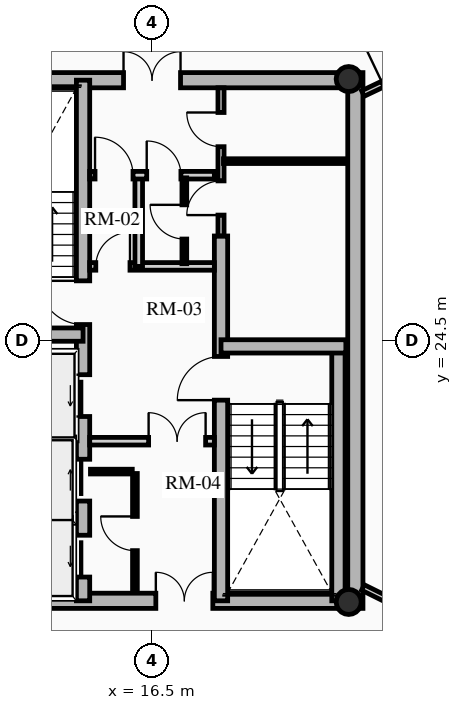
"""IFC4 building model, lengths in metres.
Left out: names, types, materials, properties, quantities, classifications, styles, units other than length and angle.
Written with IfcOpenShell. Run it as: python <this file> out.ifc"""

import sys

from ifc_helpers import new_model, si_unit, direction, frame, frame_2d, origin, origin_2d, place, context, subcontext, project, spatial, rectangle, hollow_circle, extrude, source, transform, mapped, element, fill, save


model = new_model("IFC4")
c1 = context("Model", 3, precision=1e-05, world=origin(), true_north=direction((0.0, 1.0)))
c2 = subcontext(c1, "Body", "Model", "MODEL_VIEW")
j1 = project(units=[si_unit("LENGTHUNIT", "METRE"), si_unit("PLANEANGLEUNIT", "RADIAN")], contexts=[c1])
p1 = place(None, origin())
s1 = spatial("IfcSite", under=j1, at=p1, CompositionType="ELEMENT")
p2 = place(p1, origin())
s2 = spatial("IfcBuilding", under=s1, at=p2, CompositionType="ELEMENT")
p3 = place(p2, frame((0.0, 0.0, 202.48)))
s3 = spatial("IfcBuildingStorey", under=s2, at=p3, CompositionType="ELEMENT", Elevation=202.48)
p4 = place(p3, frame((21.85, 17.45, 0.0), z_axis=(0.0, 0.0, 1.0), x_axis=(0.0, 1.0, 0.0)))
e1 = element("IfcWall", 1, at=p4, inside=s3, PredefinedType="SHEAR", context=c2, shape_type="SweptSolid", body=[
    extrude(rectangle(XDim=14.1, YDim=0.4, at=frame_2d((7.05, 0.0))), origin(), (0.0, 0.0, 1.0), 2.91),
])
p5 = place(p3, frame((11.15, 17.65, 0.0), z_axis=(0.0, 0.0, 1.0), x_axis=(1.0, 0.0, 0.0)))
e2 = element("IfcWall", 2, at=p5, inside=s3, PredefinedType="SHEAR", context=c2, shape_type="SweptSolid", body=[
    extrude(rectangle(XDim=10.7, YDim=0.4, at=frame_2d((5.35, 0.0))), origin(), (0.0, 0.0, 1.0), 2.91),
])
m1 = source(origin(), c2, "Body", "SweptSolid", [
    extrude(rectangle(XDim=1.5, YDim=2.02, at=frame_2d((0.75, 1.01))), frame((0.0, 0.21, 0.0), z_axis=(0.0, -1.0, 0.0), x_axis=(1.0, 0.0, 0.0)), (0.0, 0.0, 1.0), 0.42),
])
p6 = place(p5, frame((5.45, 0.0, 0.0)))
e3 = element("IfcOpeningElement", 3, at=p6, cuts=e2, PredefinedType="OPENING", context=c2, shape_type="MappedRepresentation", body=[
    mapped(m1, transform((0.0, 0.0, 0.0), x_axis=(1.0, 0.0, 0.0), y_axis=(0.0, 1.0, 0.0), z_axis=(0.0, 0.0, 1.0), scale=1.0)),
])
p7 = place(p3, frame((11.15, 31.35, 0.0), z_axis=(0.0, 0.0, 1.0), x_axis=(1.0, 0.0, 0.0)))
e4 = element("IfcWall", 4, at=p7, inside=s3, PredefinedType="SHEAR", context=c2, shape_type="SweptSolid", body=[
    extrude(rectangle(XDim=10.7, YDim=0.4, at=frame_2d((5.35, 0.0))), origin(), (0.0, 0.0, 1.0), 2.91),
])
p8 = place(p7, frame((4.6, 0.0, 0.0)))
e5 = element("IfcOpeningElement", 5, at=p8, cuts=e4, PredefinedType="OPENING", context=c2, shape_type="MappedRepresentation", body=[
    mapped(m1, transform((0.0, 0.0, 0.0), x_axis=(1.0, 0.0, 0.0), y_axis=(0.0, 1.0, 0.0), z_axis=(0.0, 0.0, 1.0), scale=1.0)),
])
p9 = place(p3, frame((14.685, 17.65, 0.0), z_axis=(0.0, 0.0, 1.0), x_axis=(0.0, 1.0, 0.0)))
e6 = element("IfcWall", 6, at=p9, inside=s3, PredefinedType="SHEAR", context=c2, shape_type="SweptSolid", body=[
    extrude(rectangle(XDim=13.7, YDim=0.35, at=frame_2d((6.85, 0.0))), origin(), (0.0, 0.0, 1.0), 2.91),
])
m2 = source(origin(), c2, "Body", "SweptSolid", [
    extrude(rectangle(XDim=1.1, YDim=2.015, at=frame_2d((0.55, 1.007))), frame((0.0, 0.185, 0.0), z_axis=(0.0, -1.0, 0.0), x_axis=(1.0, 0.0, 0.0)), (0.0, 0.0, 1.0), 0.37),
])
p10 = place(p9, frame((4.85, 0.0, 0.0)))
e7 = element("IfcOpeningElement", 7, at=p10, cuts=e6, PredefinedType="OPENING", context=c2, shape_type="MappedRepresentation", body=[
    mapped(m2, transform((0.0, 0.0, 0.0), x_axis=(1.0, 0.0, 0.0), y_axis=(0.0, 1.0, 0.0), z_axis=(0.0, 0.0, 1.0), scale=1.0)),
])
p11 = place(p9, frame((0.625, 0.0, 0.0)))
e8 = element("IfcOpeningElement", 8, at=p11, cuts=e6, PredefinedType="OPENING", context=c2, shape_type="MappedRepresentation", body=[
    mapped(m2, transform((0.0, 0.0, 0.0), x_axis=(1.0, 0.0, 0.0), y_axis=(0.0, 1.0, 0.0), z_axis=(0.0, 0.0, 1.0), scale=1.0)),
])
p12 = place(p9, frame((2.625, 0.0, 0.0)))
e9 = element("IfcOpeningElement", 9, at=p12, cuts=e6, PredefinedType="OPENING", context=c2, shape_type="MappedRepresentation", body=[
    mapped(m2, transform((0.0, 0.0, 0.0), x_axis=(1.0, 0.0, 0.0), y_axis=(0.0, 1.0, 0.0), z_axis=(0.0, 0.0, 1.0), scale=1.0)),
])
m3 = source(origin(), c2, "Body", "SweptSolid", [
    extrude(rectangle(XDim=1.15, YDim=2.02, at=frame_2d((0.575, 1.01))), frame((0.0, 0.185, 0.0), z_axis=(0.0, -1.0, 0.0), x_axis=(1.0, 0.0, 0.0)), (0.0, 0.0, 1.0), 0.37),
])
p13 = place(p9, frame((7.27, 0.0, 0.0)))
e10 = element("IfcOpeningElement", 10, at=p13, cuts=e6, PredefinedType="OPENING", context=c2, shape_type="MappedRepresentation", body=[
    mapped(m3, transform((0.0, 0.0, 0.0), x_axis=(1.0, 0.0, 0.0), y_axis=(0.0, 1.0, 0.0), z_axis=(0.0, 0.0, 1.0), scale=1.0)),
])
p14 = place(p3, frame((18.315, 17.65, 0.0), z_axis=(0.0, 0.0, 1.0), x_axis=(0.0, 1.0, 0.0)))
e11 = element("IfcWall", 11, at=p14, inside=s3, PredefinedType="SHEAR", context=c2, shape_type="SweptSolid", body=[
    extrude(rectangle(XDim=9.6, YDim=0.35, at=frame_2d((4.8, 0.0))), origin(), (0.0, 0.0, 1.0), 2.91),
])
p15 = place(p14, frame((5.28, 0.0, 0.0)))
e12 = element("IfcOpeningElement", 12, at=p15, cuts=e11, PredefinedType="OPENING", context=c2, shape_type="MappedRepresentation", body=[
    mapped(m3, transform((0.0, 0.0, 0.0), x_axis=(1.0, 0.0, 0.0), y_axis=(0.0, 1.0, 0.0), z_axis=(0.0, 0.0, 1.0), scale=1.0)),
])
p16 = place(p3, frame((11.4, 24.655, 0.0), z_axis=(0.0, 0.0, 1.0), x_axis=(1.0, 0.0, 0.0)))
e13 = element("IfcWall", 13, at=p16, inside=s3, PredefinedType="SHEAR", context=c2, shape_type="SweptSolid", body=[
    extrude(rectangle(XDim=3.285, YDim=0.35, at=frame_2d((1.643, 0.0))), origin(), (0.0, 0.0, 1.0), 2.91),
])
p17 = place(p3, frame((21.405, 17.65, 0.0), z_axis=(0.0, 0.0, 1.0), x_axis=(0.0, 1.0, 0.0)))
e14 = element("IfcWall", 14, at=p17, inside=s3, PredefinedType="SHEAR", context=c2, shape_type="SweptSolid", body=[
    extrude(rectangle(XDim=6.695, YDim=0.35, at=frame_2d((3.348, 0.0))), origin(), (0.0, 0.0, 1.0), 2.91),
])
p18 = place(p3, frame((18.315, 24.345, 0.0), z_axis=(0.0, 0.0, 1.0), x_axis=(1.0, 0.0, 0.0)))
e15 = element("IfcWall", 15, at=p18, inside=s3, PredefinedType="SHEAR", context=c2, shape_type="SweptSolid", body=[
    extrude(rectangle(XDim=3.285, YDim=0.35, at=frame_2d((1.643, 0.0))), origin(), (0.0, 0.0, 1.0), 2.91),
])
for number, where, z_axis, x_axis in (
    (16, (21.675, 17.62, 0.0), (0.0, 0.0, 1.0), (1.0, 0.0, 0.0)),
    (17, (21.675, 31.38, 0.0), (0.0, 0.0, 1.0), (1.0, 0.0, 0.0)),
):
    element("IfcColumn", number, at=place(p3, frame(where, z_axis=z_axis, x_axis=x_axis)), inside=s3, PredefinedType="COLUMN", context=c2, shape_type="SweptSolid", body=[
        extrude(hollow_circle(Radius=0.33, WallThickness=0.025, at=origin_2d()), origin(), (0.0, 0.0, 1.0), 2.91),
    ])
for number, where, z_axis, x_axis in (
    (18, (11.52, 21.8, 0.0), (0.0, 0.0, 1.0), (1.0, 0.0, 0.0)),
    (19, (11.52, 19.825, 0.0), (0.0, 0.0, 1.0), (1.0, 0.0, 0.0)),
):
    element("IfcWall", number, at=place(p3, frame(where, z_axis=z_axis, x_axis=x_axis)), inside=s3, PredefinedType="SHEAR", context=c2, shape_type="SweptSolid", body=[
        extrude(rectangle(XDim=2.97, YDim=0.2, at=frame_2d((1.485, 0.0))), origin(), (0.0, 0.0, 1.0), 2.91),
    ])
p19 = place(p3, frame((14.86, 21.85, 0.0), z_axis=(0.0, 0.0, 1.0), x_axis=(1.0, 0.0, 0.0)))
e20 = element("IfcWall", 20, at=p19, inside=s3, PredefinedType="PARTITIONING", context=c2, shape_type="SweptSolid", body=[
    extrude(rectangle(XDim=3.28, YDim=0.2, at=frame_2d((1.64, 0.0))), origin(), (0.0, 0.0, 1.0), 2.685),
])
m4 = source(origin(), c2, "Body", "SweptSolid", [
    extrude(rectangle(XDim=1.5, YDim=2.02, at=frame_2d((0.75, 1.01))), frame((0.0, 0.11, 0.0), z_axis=(0.0, -1.0, 0.0), x_axis=(1.0, 0.0, 0.0)), (0.0, 0.0, 1.0), 0.22),
])
p20 = place(p19, frame((1.55, 0.0, 0.0)))
e21 = element("IfcOpeningElement", 21, at=p20, cuts=e20, PredefinedType="OPENING", context=c2, shape_type="MappedRepresentation", body=[
    mapped(m4, transform((0.0, 0.0, 0.0), x_axis=(1.0, 0.0, 0.0), y_axis=(0.0, 1.0, 0.0), z_axis=(0.0, 0.0, 1.0), scale=1.0)),
])
p21 = place(p3, frame((14.86, 26.45, 0.0), z_axis=(0.0, 0.0, 1.0), x_axis=(1.0, 0.0, 0.0)))
e22 = element("IfcWall", 22, at=p21, inside=s3, PredefinedType="PARTITIONING", context=c2, shape_type="SweptSolid", body=[
    extrude(rectangle(XDim=3.28, YDim=0.2, at=frame_2d((1.64, 0.0))), origin(), (0.0, 0.0, 1.0), 2.685),
])
m5 = source(origin(), c2, "Body", "SweptSolid", [
    extrude(rectangle(XDim=0.9, YDim=2.005, at=frame_2d((0.45, 1.002))), frame((0.0, 0.11, 0.0), z_axis=(0.0, -1.0, 0.0), x_axis=(1.0, 0.0, 0.0)), (0.0, 0.0, 1.0), 0.22),
])
p22 = place(p21, frame((0.16, 0.0, 0.0)))
e23 = element("IfcOpeningElement", 23, at=p22, cuts=e22, PredefinedType="OPENING", context=c2, shape_type="MappedRepresentation", body=[
    mapped(m5, transform((0.0, 0.0, 0.0), x_axis=(1.0, 0.0, 0.0), y_axis=(0.0, 1.0, 0.0), z_axis=(0.0, 0.0, 1.0), scale=1.0)),
])
p23 = place(p3, frame((16.15, 26.45, 0.0), z_axis=(0.0, 0.0, 1.0), x_axis=(0.0, 1.0, 0.0)))
e24 = element("IfcWall", 24, at=p23, inside=s3, PredefinedType="PARTITIONING", context=c2, shape_type="SweptSolid", body=[
    extrude(rectangle(XDim=2.4, YDim=0.2, at=frame_2d((1.2, 0.0))), origin(), (0.0, 0.0, 1.0), 2.685),
])
p24 = place(p3, frame((14.86, 28.85, 0.0), z_axis=(0.0, 0.0, 1.0), x_axis=(1.0, 0.0, 0.0)))
e25 = element("IfcWall", 25, at=p24, inside=s3, PredefinedType="PARTITIONING", context=c2, shape_type="SweptSolid", body=[
    extrude(rectangle(XDim=3.28, YDim=0.2, at=frame_2d((1.64, 0.0))), origin(), (0.0, 0.0, 1.0), 2.685),
])
m6 = source(origin(), c2, "Body", "SweptSolid", [
    extrude(rectangle(XDim=1.0, YDim=2.015, at=frame_2d((0.5, 1.007))), frame((0.0, 0.11, 0.0), z_axis=(0.0, -1.0, 0.0), x_axis=(1.0, 0.0, 0.0)), (0.0, 0.0, 1.0), 0.22),
])
p25 = place(p24, frame((0.14, 0.0, 0.0)))
e26 = element("IfcOpeningElement", 26, at=p25, cuts=e25, PredefinedType="OPENING", context=c2, shape_type="MappedRepresentation", body=[
    mapped(m6, transform((0.0, 0.0, 0.0), x_axis=(1.0, 0.0, 0.0), y_axis=(0.0, 1.0, 0.0), z_axis=(0.0, 0.0, 1.0), scale=1.0)),
])
p26 = place(p24, frame((1.5, 0.0, 0.0)))
e27 = element("IfcOpeningElement", 27, at=p26, cuts=e25, PredefinedType="OPENING", context=c2, shape_type="MappedRepresentation", body=[
    mapped(m5, transform((0.0, 0.0, 0.0), x_axis=(1.0, 0.0, 0.0), y_axis=(0.0, 1.0, 0.0), z_axis=(0.0, 0.0, 1.0), scale=1.0)),
])
p27 = place(p3, frame((16.05, 17.92, 0.0), z_axis=(0.0, 0.0, 1.0), x_axis=(0.0, 1.0, 0.0)))
e28 = element("IfcWall", 28, at=p27, inside=s3, PredefinedType="PARTITIONING", context=c2, shape_type="SweptSolid", body=[
    extrude(rectangle(XDim=3.08, YDim=0.125, at=frame_2d((1.54, 0.0))), origin(), (0.0, 0.0, 1.0), 2.685),
])
m7 = source(origin(), c2, "Body", "SweptSolid", [
    extrude(rectangle(XDim=0.9, YDim=2.005, at=frame_2d((0.45, 1.002))), frame((0.0, 0.073, 0.0), z_axis=(0.0, -1.0, 0.0), x_axis=(1.0, 0.0, 0.0)), (0.0, 0.0, 1.0), 0.145),
])
p28 = place(p27, frame((1.05, 0.0, 0.0)))
e29 = element("IfcOpeningElement", 29, at=p28, cuts=e28, PredefinedType="OPENING", context=c2, shape_type="MappedRepresentation", body=[
    mapped(m7, transform((0.0, 0.0, 0.0), x_axis=(1.0, 0.0, 0.0), y_axis=(0.0, 1.0, 0.0), z_axis=(0.0, 0.0, 1.0), scale=1.0)),
])
p29 = place(p3, frame((14.88, 21.05, 0.0), z_axis=(0.0, 0.0, 1.0), x_axis=(1.0, 0.0, 0.0)))
e30 = element("IfcWall", 30, at=p29, inside=s3, PredefinedType="PARTITIONING", context=c2, shape_type="SweptSolid", body=[
    extrude(rectangle(XDim=1.1, YDim=0.125, at=frame_2d((0.55, 0.0))), origin(), (0.0, 0.0, 1.0), 2.685),
])
p30 = place(p3, frame((17.35, 26.52, 0.0), z_axis=(0.0, 0.0, 1.0), x_axis=(0.0, 1.0, 0.0)))
e31 = element("IfcWall", 31, at=p30, inside=s3, PredefinedType="PARTITIONING", context=c2, shape_type="SweptSolid", body=[
    extrude(rectangle(XDim=2.26, YDim=0.125, at=frame_2d((1.13, 0.0))), origin(), (0.0, 0.0, 1.0), 2.685),
])
p31 = place(p30, frame((0.65, 0.0, 0.0)))
e32 = element("IfcOpeningElement", 32, at=p31, cuts=e31, PredefinedType="OPENING", context=c2, shape_type="MappedRepresentation", body=[
    mapped(m7, transform((0.0, 0.0, 0.0), x_axis=(1.0, 0.0, 0.0), y_axis=(0.0, 1.0, 0.0), z_axis=(0.0, 0.0, 1.0), scale=1.0)),
])
p32 = place(p3, frame((18.315, 27.25, 0.0), z_axis=(0.0, 0.0, 1.0), x_axis=(0.0, 1.0, 0.0)))
e33 = element("IfcWall", 33, at=p32, inside=s3, PredefinedType="PARTITIONING", context=c2, shape_type="SweptSolid", body=[
    extrude(rectangle(XDim=3.9, YDim=0.16, at=frame_2d((1.95, 0.0))), origin(), (0.0, 0.0, 1.0), 2.685),
])
m8 = source(origin(), c2, "Body", "SweptSolid", [
    extrude(rectangle(XDim=0.9, YDim=2.005, at=frame_2d((0.45, 1.002))), frame((0.0, 0.09, 0.0), z_axis=(0.0, -1.0, 0.0), x_axis=(1.0, 0.0, 0.0)), (0.0, 0.0, 1.0), 0.18),
])
p33 = place(p32, frame((0.55, 0.0, 0.0)))
e34 = element("IfcOpeningElement", 34, at=p33, cuts=e33, PredefinedType="OPENING", context=c2, shape_type="MappedRepresentation", body=[
    mapped(m8, transform((0.0, 0.0, 0.0), x_axis=(1.0, 0.0, 0.0), y_axis=(0.0, 1.0, 0.0), z_axis=(0.0, 0.0, 1.0), scale=1.0)),
])
p34 = place(p32, frame((2.35, 0.0, 0.0)))
e35 = element("IfcOpeningElement", 35, at=p34, cuts=e33, PredefinedType="OPENING", context=c2, shape_type="MappedRepresentation", body=[
    mapped(m8, transform((0.0, 0.0, 0.0), x_axis=(1.0, 0.0, 0.0), y_axis=(0.0, 1.0, 0.0), z_axis=(0.0, 0.0, 1.0), scale=1.0)),
])
p35 = place(p3, frame((18.38, 29.22, 0.0), z_axis=(0.0, 0.0, 1.0), x_axis=(1.0, 0.0, 0.0)))
e36 = element("IfcWall", 36, at=p35, inside=s3, PredefinedType="PARTITIONING", context=c2, shape_type="SweptSolid", body=[
    extrude(rectangle(XDim=3.22, YDim=0.125, at=frame_2d((1.61, 0.0))), origin(), (0.0, 0.0, 1.0), 2.222),
])
p36 = place(p3, frame((22.05, 31.0, 0.0), z_axis=(0.0, 0.0, 1.0), x_axis=(0.903013459407, 0.429612257891, 0.0)))
e37 = element("IfcWall", 37, at=p36, inside=s3, PredefinedType="PARTITIONING", context=c2, shape_type="SweptSolid", body=[
    extrude(rectangle(XDim=1.829, YDim=0.16, at=frame_2d((0.914, 0.0))), origin(), (0.0, 0.0, 1.0), 2.255),
])
m9 = source(origin(), c2, "Body", "SweptSolid", [
    extrude(rectangle(XDim=1.05, YDim=2.015, at=frame_2d((0.525, 1.007))), frame((0.0, 0.09, 0.0), z_axis=(0.0, -1.0, 0.0), x_axis=(1.0, 0.0, 0.0)), (0.0, 0.0, 1.0), 0.18),
])
p37 = place(p36, frame((0.579, 0.0, 0.0)))
e38 = element("IfcOpeningElement", 38, at=p37, cuts=e37, PredefinedType="OPENING", context=c2, shape_type="MappedRepresentation", body=[
    mapped(m9, transform((0.0, 0.0, 0.0), x_axis=(1.0, 0.0, 0.0), y_axis=(0.0, 1.0, 0.0), z_axis=(0.0, 0.0, 1.0), scale=1.0)),
])
p38 = place(p3, frame((22.05, 18.0, 0.0), z_axis=(0.0, 0.0, 1.0), x_axis=(0.896045848613, -0.443961526692, 0.0)))
e39 = element("IfcWall", 39, at=p38, inside=s3, PredefinedType="PARTITIONING", context=c2, shape_type="SweptSolid", body=[
    extrude(rectangle(XDim=1.924, YDim=0.16, at=frame_2d((0.962, 0.0))), origin(), (0.0, 0.0, 1.0), 2.255),
])
p39 = place(p38, frame((0.674, 0.0, 0.0)))
e40 = element("IfcOpeningElement", 40, at=p39, cuts=e39, PredefinedType="OPENING", context=c2, shape_type="MappedRepresentation", body=[
    mapped(m9, transform((0.0, 0.0, 0.0), x_axis=(1.0, 0.0, 0.0), y_axis=(0.0, 1.0, 0.0), z_axis=(0.0, 0.0, 1.0), scale=1.0)),
])
m10 = source(origin(), c2, "Body", "SweptSolid", [
    extrude(rectangle(XDim=1.1, YDim=2.015, at=frame_2d((0.55, 1.007))), frame((0.0, 0.025, 0.0), z_axis=(0.0, -1.0, 0.0), x_axis=(1.0, 0.0, 0.0)), (0.0, 0.0, 1.0), 0.05),
])
p40 = place(p10, origin())
e41 = element("IfcDoor", 41, at=p40, inside=s3, OperationType="SLIDING_TO_LEFT", PredefinedType="DOOR", context=c2, shape_type="MappedRepresentation", body=[
    mapped(m10, transform((0.0, 0.0, 0.0), x_axis=(1.0, 0.0, 0.0), y_axis=(0.0, 1.0, 0.0), z_axis=(0.0, 0.0, 1.0), scale=1.0)),
])
fill(e7, e41)
p41 = place(p11, origin())
e42 = element("IfcDoor", 42, at=p41, inside=s3, OperationType="SLIDING_TO_LEFT", PredefinedType="DOOR", context=c2, shape_type="MappedRepresentation", body=[
    mapped(m10, transform((0.0, 0.0, 0.0), x_axis=(1.0, 0.0, 0.0), y_axis=(0.0, 1.0, 0.0), z_axis=(0.0, 0.0, 1.0), scale=1.0)),
])
fill(e8, e42)
p42 = place(p12, origin())
e43 = element("IfcDoor", 43, at=p42, inside=s3, OperationType="SLIDING_TO_RIGHT", PredefinedType="DOOR", context=c2, shape_type="MappedRepresentation", body=[
    mapped(m10, transform((0.0, 0.0, 0.0), x_axis=(1.0, 0.0, 0.0), y_axis=(0.0, 1.0, 0.0), z_axis=(0.0, 0.0, 1.0), scale=1.0)),
])
fill(e9, e43)
m11 = source(origin(), c2, "Body", "SweptSolid", [
    extrude(rectangle(XDim=1.15, YDim=2.02, at=frame_2d((0.575, 1.01))), frame((0.0, 0.025, 0.0), z_axis=(0.0, -1.0, 0.0), x_axis=(1.0, 0.0, 0.0)), (0.0, 0.0, 1.0), 0.05),
])
p43 = place(p13, origin())
e44 = element("IfcDoor", 44, at=p43, inside=s3, OperationType="SINGLE_SWING_RIGHT", PredefinedType="DOOR", context=c2, shape_type="MappedRepresentation", body=[
    mapped(m11, transform((0.0, 0.0, 0.0), x_axis=(1.0, 0.0, 0.0), y_axis=(0.0, 1.0, 0.0), z_axis=(0.0, 0.0, 1.0), scale=1.0)),
])
fill(e10, e44)
p44 = place(p15, origin())
e45 = element("IfcDoor", 45, at=p44, inside=s3, OperationType="SINGLE_SWING_LEFT", PredefinedType="DOOR", context=c2, shape_type="MappedRepresentation", body=[
    mapped(m11, transform((0.0, 0.0, 0.0), x_axis=(1.0, 0.0, 0.0), y_axis=(0.0, 1.0, 0.0), z_axis=(0.0, 0.0, 1.0), scale=1.0)),
])
fill(e12, e45)
m12 = source(origin(), c2, "Body", "SweptSolid", [
    extrude(rectangle(XDim=1.5, YDim=2.02, at=frame_2d((0.75, 1.01))), frame((0.0, 0.025, 0.0), z_axis=(0.0, -1.0, 0.0), x_axis=(1.0, 0.0, 0.0)), (0.0, 0.0, 1.0), 0.05),
])
p45 = place(p8, origin())
e46 = element("IfcDoor", 46, at=p45, inside=s3, OperationType="DOUBLE_DOOR_SINGLE_SWING", PredefinedType="DOOR", context=c2, shape_type="MappedRepresentation", body=[
    mapped(m12, transform((0.0, 0.0, 0.0), x_axis=(1.0, 0.0, 0.0), y_axis=(0.0, 1.0, 0.0), z_axis=(0.0, 0.0, 1.0), scale=1.0)),
])
fill(e5, e46)
p46 = place(p6, origin())
e47 = element("IfcDoor", 47, at=p46, inside=s3, OperationType="DOUBLE_DOOR_SINGLE_SWING", PredefinedType="DOOR", context=c2, shape_type="MappedRepresentation", body=[
    mapped(m12, transform((0.0, 0.0, 0.0), x_axis=(1.0, 0.0, 0.0), y_axis=(0.0, 1.0, 0.0), z_axis=(0.0, 0.0, 1.0), scale=1.0)),
])
fill(e3, e47)
p47 = place(p20, origin())
e48 = element("IfcDoor", 48, at=p47, inside=s3, OperationType="DOUBLE_DOOR_SINGLE_SWING", PredefinedType="DOOR", context=c2, shape_type="MappedRepresentation", body=[
    mapped(m12, transform((0.0, 0.0, 0.0), x_axis=(1.0, 0.0, 0.0), y_axis=(0.0, 1.0, 0.0), z_axis=(0.0, 0.0, 1.0), scale=1.0)),
])
fill(e21, e48)
m13 = source(origin(), c2, "Body", "SweptSolid", [
    extrude(rectangle(XDim=0.9, YDim=2.005, at=frame_2d((0.45, 1.002))), frame((0.0, 0.025, 0.0), z_axis=(0.0, -1.0, 0.0), x_axis=(1.0, 0.0, 0.0)), (0.0, 0.0, 1.0), 0.05),
])
p48 = place(p22, origin())
e49 = element("IfcDoor", 49, at=p48, inside=s3, OperationType="SINGLE_SWING_RIGHT", PredefinedType="DOOR", context=c2, shape_type="MappedRepresentation", body=[
    mapped(m13, transform((0.0, 0.0, 0.0), x_axis=(1.0, 0.0, 0.0), y_axis=(0.0, 1.0, 0.0), z_axis=(0.0, 0.0, 1.0), scale=1.0)),
])
fill(e23, e49)
m14 = source(origin(), c2, "Body", "SweptSolid", [
    extrude(rectangle(XDim=1.0, YDim=2.015, at=frame_2d((0.5, 1.007))), frame((0.0, 0.025, 0.0), z_axis=(0.0, -1.0, 0.0), x_axis=(1.0, 0.0, 0.0)), (0.0, 0.0, 1.0), 0.05),
])
p49 = place(p25, origin())
e50 = element("IfcDoor", 50, at=p49, inside=s3, OperationType="SINGLE_SWING_LEFT", PredefinedType="DOOR", context=c2, shape_type="MappedRepresentation", body=[
    mapped(m14, transform((0.0, 0.0, 0.0), x_axis=(1.0, 0.0, 0.0), y_axis=(0.0, 1.0, 0.0), z_axis=(0.0, 0.0, 1.0), scale=1.0)),
])
fill(e26, e50)
p50 = place(p28, origin())
e51 = element("IfcDoor", 51, at=p50, inside=s3, OperationType="SINGLE_SWING_RIGHT", PredefinedType="DOOR", context=c2, shape_type="MappedRepresentation", body=[
    mapped(m13, transform((0.0, 0.0, 0.0), x_axis=(1.0, 0.0, 0.0), y_axis=(0.0, 1.0, 0.0), z_axis=(0.0, 0.0, 1.0), scale=1.0)),
])
fill(e29, e51)
p51 = place(p26, origin())
e52 = element("IfcDoor", 52, at=p51, inside=s3, OperationType="SINGLE_SWING_LEFT", PredefinedType="DOOR", context=c2, shape_type="MappedRepresentation", body=[
    mapped(m13, transform((0.0, 0.0, 0.0), x_axis=(1.0, 0.0, 0.0), y_axis=(0.0, 1.0, 0.0), z_axis=(0.0, 0.0, 1.0), scale=1.0)),
])
fill(e27, e52)
p52 = place(p31, origin())
e53 = element("IfcDoor", 53, at=p52, inside=s3, OperationType="SINGLE_SWING_RIGHT", PredefinedType="DOOR", context=c2, shape_type="MappedRepresentation", body=[
    mapped(m13, transform((0.0, 0.0, 0.0), x_axis=(1.0, 0.0, 0.0), y_axis=(0.0, 1.0, 0.0), z_axis=(0.0, 0.0, 1.0), scale=1.0)),
])
fill(e32, e53)
p53 = place(p33, origin())
e54 = element("IfcDoor", 54, at=p53, inside=s3, OperationType="SINGLE_SWING_LEFT", PredefinedType="DOOR", context=c2, shape_type="MappedRepresentation", body=[
    mapped(m13, transform((0.0, 0.0, 0.0), x_axis=(1.0, 0.0, 0.0), y_axis=(0.0, 1.0, 0.0), z_axis=(0.0, 0.0, 1.0), scale=1.0)),
])
fill(e34, e54)
p54 = place(p34, origin())
e55 = element("IfcDoor", 55, at=p54, inside=s3, OperationType="SINGLE_SWING_RIGHT", PredefinedType="DOOR", context=c2, shape_type="MappedRepresentation", body=[
    mapped(m13, transform((0.0, 0.0, 0.0), x_axis=(1.0, 0.0, 0.0), y_axis=(0.0, 1.0, 0.0), z_axis=(0.0, 0.0, 1.0), scale=1.0)),
])
fill(e35, e55)
save(model, sys.argv[1])
